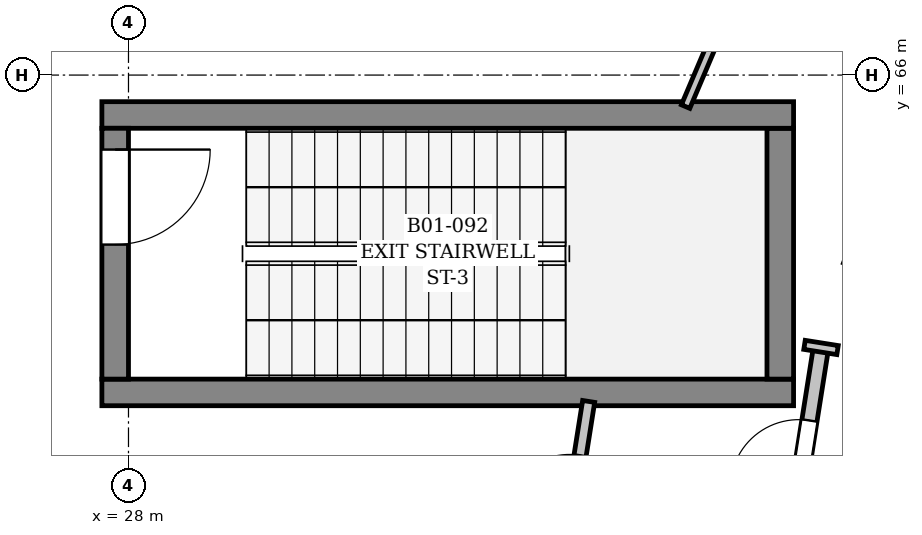
"""IFC4 building model, lengths in metres.
Left out: names, types, materials, properties, quantities, classifications, styles, units other than length and angle.
Written with IfcOpenShell. Run it as: python <this file> out.ifc"""

import sys

from ifc_helpers import new_model, si_unit, direction, frame, frame_2d, origin, place, context, subcontext, project, spatial, rectangle, extrude, element, fill, save


model = new_model("IFC4")
c1 = context("Model", 3, precision=1e-05, world=origin(), true_north=direction((0.0, 1.0)))
c2 = subcontext(c1, "Body", "Model", "MODEL_VIEW")
j1 = project(units=[si_unit("LENGTHUNIT", "METRE"), si_unit("PLANEANGLEUNIT", "RADIAN")], contexts=[c1])
p1 = place(None, origin())
s1 = spatial("IfcSite", under=j1, at=p1, CompositionType="ELEMENT")
p2 = place(p1, origin())
s2 = spatial("IfcBuilding", under=s1, at=p2, CompositionType="ELEMENT")
p3 = place(p2, frame((0.0, 0.0, -5.4)))
s3 = spatial("IfcBuildingStorey", under=s2, at=p3, CompositionType="ELEMENT", Elevation=-5.4)
p4 = place(p3, frame((38.016, 61.356, 0.0), z_axis=(0.0, 0.0, 1.0), x_axis=(-0.183196231413, -0.983076365699, 0.0)))
e1 = element("IfcWall", 1, at=p4, inside=s3, PredefinedType="USERDEFINED", context=c2, shape_type="SweptSolid", body=[
    extrude(rectangle(XDim=2.227, YDim=0.55, at=frame_2d((1.113, 0.0))), origin(), (0.0, 0.0, 1.0), 5.05),
])
p5 = place(p3, frame((27.65, 61.825, 0.0), z_axis=(0.0, 0.0, 1.0), x_axis=(1.0, 0.0, 0.0)))
e2 = element("IfcWall", 2, at=p5, inside=s3, PredefinedType="SHEAR", context=c2, shape_type="SweptSolid", body=[
    extrude(rectangle(XDim=9.1, YDim=0.35, at=frame_2d((4.55, 0.0))), origin(), (0.0, 0.0, 1.0), 5.05),
])
p6 = place(p3, frame((36.575, 62.0, 0.0), z_axis=(0.0, 0.0, 1.0), x_axis=(0.0, 1.0, 0.0)))
e3 = element("IfcWall", 3, at=p6, inside=s3, PredefinedType="SHEAR", context=c2, shape_type="SweptSolid", body=[
    extrude(rectangle(XDim=3.3, YDim=0.35, at=frame_2d((1.65, 0.0))), origin(), (0.0, 0.0, 1.0), 5.05),
])
p7 = place(p3, frame((36.75, 65.475, 0.0), z_axis=(0.0, 0.0, 1.0), x_axis=(-1.0, 0.0, 0.0)))
e4 = element("IfcWall", 4, at=p7, inside=s3, PredefinedType="SHEAR", context=c2, shape_type="SweptSolid", body=[
    extrude(rectangle(XDim=9.1, YDim=0.35, at=frame_2d((4.55, 0.0))), origin(), (0.0, 0.0, 1.0), 5.05),
])
p8 = place(p3, frame((27.825, 65.3, 0.0), z_axis=(0.0, 0.0, 1.0), x_axis=(0.0, -1.0, 0.0)))
e5 = element("IfcWall", 5, at=p8, inside=s3, PredefinedType="SHEAR", context=c2, shape_type="SweptSolid", body=[
    extrude(rectangle(XDim=3.3, YDim=0.35, at=frame_2d((1.65, 0.0))), origin(), (0.0, 0.0, 1.0), 5.05),
])
p9 = place(p8, frame((0.28, 0.0, 0.0)))
e6 = element("IfcOpeningElement", 6, at=p9, cuts=e5, PredefinedType="OPENING", context=c2, shape_type="SweptSolid", body=[
    extrude(rectangle(XDim=1.25, YDim=2.2, at=frame_2d((0.625, 1.1))), frame((0.0, 0.185, 0.0), z_axis=(0.0, -1.0, 0.0), x_axis=(1.0, 0.0, 0.0)), (0.0, 0.0, 1.0), 0.37),
])
p10 = place(p3, frame((36.362, 57.686, 0.0), z_axis=(0.0, 0.0, 1.0), x_axis=(0.156391852422, 0.987695088829, 0.0)))
e7 = element("IfcWall", 7, at=p10, inside=s3, PredefinedType="PARTITIONING", context=c2, shape_type="SweptSolid", body=[
    extrude(rectangle(XDim=4.789, YDim=0.2, at=frame_2d((2.395, 0.0))), origin(), (0.0, 0.0, 1.0), 4.04),
])
p11 = place(p10, frame((2.917, 0.0, 0.0)))
e8 = element("IfcOpeningElement", 8, at=p11, cuts=e7, PredefinedType="OPENING", context=c2, shape_type="SweptSolid", body=[
    extrude(rectangle(XDim=0.9, YDim=2.1, at=frame_2d((0.45, 1.05))), frame((0.0, 0.11, 0.0), z_axis=(0.0, -1.0, 0.0), x_axis=(1.0, 0.0, 0.0)), (0.0, 0.0, 1.0), 0.22),
])
p12 = place(p3, frame((36.471, 68.275, 0.0), z_axis=(0.0, 0.0, 1.0), x_axis=(-0.39080089657, -0.920475235539, 0.0)))
e9 = element("IfcWall", 9, at=p12, inside=s3, PredefinedType="PARTITIONING", context=c2, shape_type="SweptSolid", body=[
    extrude(rectangle(XDim=2.922, YDim=0.12, at=frame_2d((1.461, 0.0))), origin(), (0.0, 0.0, 1.0), 3.84),
])
p13 = place(p12, frame((1.095, 0.0, 0.0)))
e10 = element("IfcOpeningElement", 10, at=p13, cuts=e9, PredefinedType="OPENING", context=c2, shape_type="SweptSolid", body=[
    extrude(rectangle(XDim=0.95, YDim=2.2, at=frame_2d((0.475, 1.1))), frame((0.0, 0.07, 0.0), z_axis=(0.0, -1.0, 0.0), x_axis=(1.0, 0.0, 0.0)), (0.0, 0.0, 1.0), 0.14),
])
p14 = place(p3, frame((33.795, 60.07, 0.0), z_axis=(0.0, 0.0, 1.0), x_axis=(0.156461874538, 0.987683998967, 0.0)))
e11 = element("IfcWall", 11, at=p14, inside=s3, PredefinedType="PARTITIONING", context=c2, shape_type="SweptSolid", body=[
    extrude(rectangle(XDim=1.657, YDim=0.16, at=frame_2d((0.829, 0.0))), origin(), (0.0, 0.0, 1.0), 5.05),
])
p15 = place(p14, frame((0.04, 0.0, 0.0)))
e12 = element("IfcOpeningElement", 12, at=p15, cuts=e11, PredefinedType="OPENING", context=c2, shape_type="SweptSolid", body=[
    extrude(rectangle(XDim=0.9, YDim=2.1, at=frame_2d((0.45, 1.05))), frame((0.0, 0.09, 0.0), z_axis=(0.0, -1.0, 0.0), x_axis=(1.0, 0.0, 0.0)), (0.0, 0.0, 1.0), 0.18),
])
p16 = place(p3, frame((37.329, 62.382, 0.0), z_axis=(0.0, 0.0, 1.0), x_axis=(-0.987695424831, 0.156389730378, 0.0)))
e13 = element("IfcWall", 13, at=p16, inside=s3, PredefinedType="PARTITIONING", context=c2, shape_type="SweptSolid", body=[
    extrude(rectangle(XDim=0.44, YDim=0.12, at=frame_2d((0.22, 0.0))), origin(), (0.0, 0.0, 1.0), 5.05),
])
p17 = place(p9, origin())
e14 = element("IfcDoor", 14, at=p17, inside=s3, OperationType="SINGLE_SWING_LEFT", PredefinedType="DOOR", context=c2, shape_type="SweptSolid", body=[
    extrude(rectangle(XDim=1.25, YDim=2.2, at=frame_2d((0.625, 1.1))), frame((0.0, 0.025, 0.0), z_axis=(0.0, -1.0, 0.0), x_axis=(1.0, 0.0, 0.0)), (0.0, 0.0, 1.0), 0.05),
])
fill(e6, e14)
p18 = place(p11, origin())
e15 = element("IfcDoor", 15, at=p18, inside=s3, OperationType="SINGLE_SWING_LEFT", PredefinedType="DOOR", context=c2, shape_type="SweptSolid", body=[
    extrude(rectangle(XDim=0.9, YDim=2.1, at=frame_2d((0.45, 1.05))), frame((0.0, 0.025, 0.0), z_axis=(0.0, -1.0, 0.0), x_axis=(1.0, 0.0, 0.0)), (0.0, 0.0, 1.0), 0.05),
])
fill(e8, e15)
p19 = place(p15, origin())
e16 = element("IfcDoor", 16, at=p19, inside=s3, OperationType="SINGLE_SWING_RIGHT", PredefinedType="DOOR", context=c2, shape_type="SweptSolid", body=[
    extrude(rectangle(XDim=0.9, YDim=2.1, at=frame_2d((0.45, 1.05))), frame((0.0, 0.025, 0.0), z_axis=(0.0, -1.0, 0.0), x_axis=(1.0, 0.0, 0.0)), (0.0, 0.0, 1.0), 0.05),
])
fill(e12, e16)
save(model, sys.argv[1])
